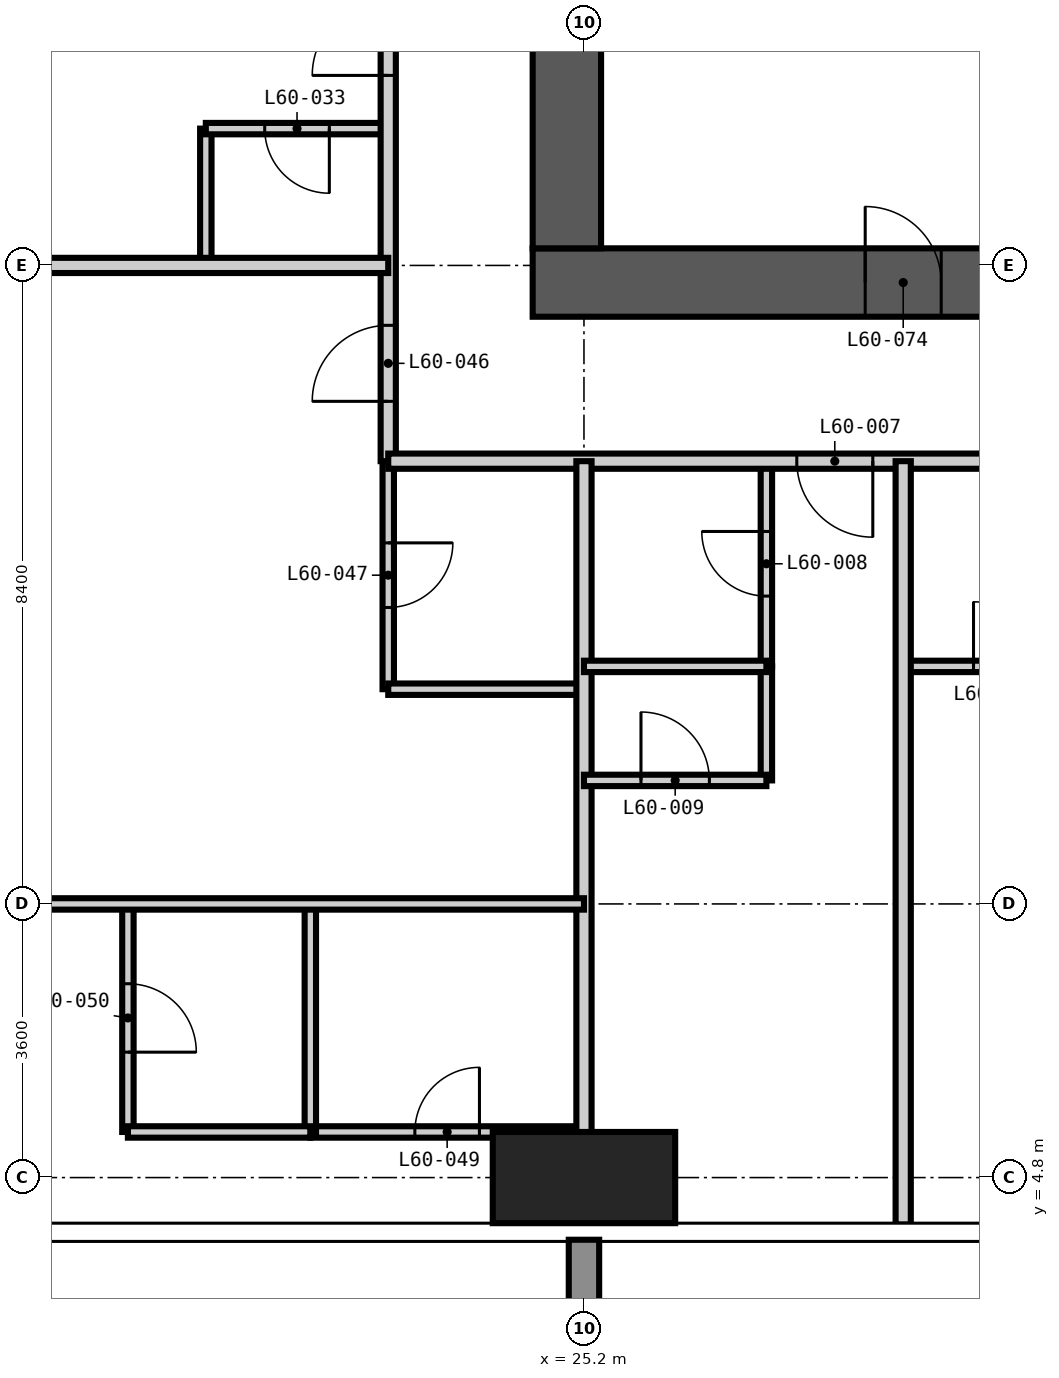
"""IFC4 building model, lengths in metres.
Left out: names, types, materials, properties, quantities, classifications, styles, units other than length and angle.
Written with IfcOpenShell. Run it as: python <this file> out.ifc"""

import sys

from ifc_helpers import new_model, si_unit, direction, frame, frame_2d, origin, origin_2d, place, context, subcontext, project, spatial, rectangle, extrude, element, fill, save


model = new_model("IFC4")
c1 = context("Model", 3, precision=1e-05, world=origin(), true_north=direction((0.0, 1.0)))
c2 = subcontext(c1, "Body", "Model", "MODEL_VIEW")
j1 = project(units=[si_unit("LENGTHUNIT", "METRE"), si_unit("PLANEANGLEUNIT", "RADIAN")], contexts=[c1])
p1 = place(None, origin())
s1 = spatial("IfcSite", under=j1, at=p1, CompositionType="ELEMENT")
p2 = place(p1, origin())
s2 = spatial("IfcBuilding", under=s1, at=p2, CompositionType="ELEMENT")
p3 = place(p2, frame((0.0, 0.0, 233.4)))
s3 = spatial("IfcBuildingStorey", under=s2, at=p3, CompositionType="ELEMENT", Elevation=233.4)
p4 = place(p3, frame((25.2, 4.8, -0.35), z_axis=(0.0, 0.0, 1.0), x_axis=(1.0, 0.0, 0.0)))
e1 = element("IfcColumn", 1, at=p4, inside=s3, PredefinedType="COLUMN", context=c2, shape_type="SweptSolid", body=[
    extrude(rectangle(XDim=2.4, YDim=1.2, at=origin_2d()), origin(), (0.0, 0.0, 1.0), 3.9),
])
p5 = place(p3, frame((24.525, 16.575, -0.35), z_axis=(0.0, 0.0, 1.0), x_axis=(1.0, 0.0, 0.0)))
e2 = element("IfcWall", 2, at=p5, inside=s3, PredefinedType="SHEAR", context=c2, shape_type="SweptSolid", body=[
    extrude(rectangle(XDim=18.15, YDim=0.9, at=frame_2d((9.075, 0.0))), origin(), (0.0, 0.0, 1.0), 3.9),
])
p6 = place(p5, frame((4.375, 0.0, 0.35)))
e3 = element("IfcOpeningElement", 3, at=p6, cuts=e2, PredefinedType="OPENING", context=c2, shape_type="SweptSolid", body=[
    extrude(rectangle(XDim=1.0, YDim=2.1, at=frame_2d((0.5, 1.05))), frame((0.0, 0.46, 0.0), z_axis=(0.0, -1.0, 0.0), x_axis=(1.0, 0.0, 0.0)), (0.0, 0.0, 1.0), 0.92),
])
p7 = place(p5, frame((10.675, 0.0, 0.35)))
e4 = element("IfcOpeningElement", 4, at=p7, cuts=e2, PredefinedType="OPENING", context=c2, shape_type="SweptSolid", body=[
    extrude(rectangle(XDim=1.0, YDim=2.1, at=frame_2d((0.5, 1.05))), frame((0.0, 0.46, 0.0), z_axis=(0.0, -1.0, 0.0), x_axis=(1.0, 0.0, 0.0)), (0.0, 0.0, 1.0), 0.92),
])
p8 = place(p3, frame((24.975, 41.775, -0.35), z_axis=(0.0, 0.0, 1.0), x_axis=(0.0, -1.0, 0.0)))
e5 = element("IfcWall", 5, at=p8, inside=s3, PredefinedType="SHEAR", context=c2, shape_type="SweptSolid", body=[
    extrude(rectangle(XDim=24.75, YDim=0.9, at=frame_2d((12.375, 0.0))), origin(), (0.0, 0.0, 1.0), 3.9),
])
p9 = place(p8, frame((11.875, 0.0, 0.35)))
e6 = element("IfcOpeningElement", 6, at=p9, cuts=e5, PredefinedType="OPENING", context=c2, shape_type="SweptSolid", body=[
    extrude(rectangle(XDim=1.0, YDim=2.1, at=frame_2d((0.5, 1.05))), frame((0.0, 0.46, 0.0), z_axis=(0.0, -1.0, 0.0), x_axis=(1.0, 0.0, 0.0)), (0.0, 0.0, 1.0), 0.92),
])
p10 = place(p3, frame((20.225, 16.8, 0.0), z_axis=(0.0, 0.0, 1.0), x_axis=(0.0, 1.0, 0.0)))
e7 = element("IfcWall", 7, at=p10, inside=s3, PredefinedType="PARTITIONING", context=c2, shape_type="SweptSolid", body=[
    extrude(rectangle(XDim=1.8, YDim=0.15, at=frame_2d((0.9, 0.0))), origin(), (0.0, 0.0, 1.0), 3.55),
])
p11 = place(p3, frame((22.625, 11.225, 0.0), z_axis=(0.0, 0.0, 1.0), x_axis=(0.0, 1.0, 0.0)))
e8 = element("IfcWall", 8, at=p11, inside=s3, PredefinedType="PARTITIONING", context=c2, shape_type="SweptSolid", body=[
    extrude(rectangle(XDim=3.0, YDim=0.15, at=frame_2d((1.5, 0.0))), origin(), (0.0, 0.0, 1.0), 3.55),
])
p12 = place(p11, frame((1.075, 0.0, 0.0)))
e9 = element("IfcOpeningElement", 9, at=p12, cuts=e8, PredefinedType="OPENING", context=c2, shape_type="SweptSolid", body=[
    extrude(rectangle(XDim=0.85, YDim=2.1, at=frame_2d((0.425, 1.05))), frame((0.0, 0.085, 0.0), z_axis=(0.0, -1.0, 0.0), x_axis=(1.0, 0.0, 0.0)), (0.0, 0.0, 1.0), 0.17),
])
p13 = place(p3, frame((27.6, 11.525, 0.0), z_axis=(0.0, 0.0, 1.0), x_axis=(0.0, 1.0, 0.0)))
e10 = element("IfcWall", 10, at=p13, inside=s3, PredefinedType="PARTITIONING", context=c2, shape_type="SweptSolid", body=[
    extrude(rectangle(XDim=2.7, YDim=0.15, at=frame_2d((1.35, 0.0))), origin(), (0.0, 0.0, 1.0), 3.55),
])
p14 = place(p13, frame((0.925, 0.0, 0.0)))
e11 = element("IfcOpeningElement", 11, at=p14, cuts=e10, PredefinedType="OPENING", context=c2, shape_type="SweptSolid", body=[
    extrude(rectangle(XDim=0.85, YDim=2.1, at=frame_2d((0.425, 1.05))), frame((0.0, 0.085, 0.0), z_axis=(0.0, -1.0, 0.0), x_axis=(1.0, 0.0, 0.0)), (0.0, 0.0, 1.0), 0.17),
])
p15 = place(p3, frame((21.6, 5.4, 0.0), z_axis=(0.0, 0.0, 1.0), x_axis=(1.0, 0.0, 0.0)))
e12 = element("IfcWall", 12, at=p15, inside=s3, PredefinedType="PARTITIONING", context=c2, shape_type="SweptSolid", body=[
    extrude(rectangle(XDim=3.6, YDim=0.15, at=frame_2d((1.8, 0.0))), origin(), (0.0, 0.0, 1.0), 3.55),
])
p16 = place(p15, frame((1.375, 0.0, 0.0)))
e13 = element("IfcOpeningElement", 13, at=p16, cuts=e12, PredefinedType="OPENING", context=c2, shape_type="SweptSolid", body=[
    extrude(rectangle(XDim=0.85, YDim=2.1, at=frame_2d((0.425, 1.05))), frame((0.0, 0.085, 0.0), z_axis=(0.0, -1.0, 0.0), x_axis=(1.0, 0.0, 0.0)), (0.0, 0.0, 1.0), 0.17),
])
p17 = place(p3, frame((22.625, 11.225, 0.0), z_axis=(0.0, 0.0, 1.0), x_axis=(1.0, 0.0, 0.0)))
e14 = element("IfcWall", 14, at=p17, inside=s3, PredefinedType="PARTITIONING", context=c2, shape_type="SweptSolid", body=[
    extrude(rectangle(XDim=2.575, YDim=0.15, at=frame_2d((1.288, 0.0))), origin(), (0.0, 0.0, 1.0), 3.55),
])
p18 = place(p3, frame((29.4, 11.525, 0.0), z_axis=(0.0, 0.0, 1.0), x_axis=(1.0, 0.0, 0.0)))
e15 = element("IfcWall", 15, at=p18, inside=s3, PredefinedType="PARTITIONING", context=c2, shape_type="SweptSolid", body=[
    extrude(rectangle(XDim=2.7, YDim=0.15, at=frame_2d((1.35, 0.0))), origin(), (0.0, 0.0, 1.0), 3.55),
])
p19 = place(p18, frame((0.925, 0.0, 0.0)))
e16 = element("IfcOpeningElement", 16, at=p19, cuts=e15, PredefinedType="OPENING", context=c2, shape_type="SweptSolid", body=[
    extrude(rectangle(XDim=0.85, YDim=2.1, at=frame_2d((0.425, 1.05))), frame((0.0, 0.085, 0.0), z_axis=(0.0, -1.0, 0.0), x_axis=(1.0, 0.0, 0.0)), (0.0, 0.0, 1.0), 0.17),
])
p20 = place(p3, frame((20.225, 18.6, 0.0), z_axis=(0.0, 0.0, 1.0), x_axis=(1.0, 0.0, 0.0)))
e17 = element("IfcWall", 17, at=p20, inside=s3, PredefinedType="PARTITIONING", context=c2, shape_type="SweptSolid", body=[
    extrude(rectangle(XDim=2.4, YDim=0.15, at=frame_2d((1.2, 0.0))), origin(), (0.0, 0.0, 1.0), 3.55),
])
p21 = place(p20, frame((0.775, 0.0, 0.0)))
e18 = element("IfcOpeningElement", 18, at=p21, cuts=e17, PredefinedType="OPENING", context=c2, shape_type="SweptSolid", body=[
    extrude(rectangle(XDim=0.85, YDim=2.1, at=frame_2d((0.425, 1.05))), frame((0.0, 0.085, 0.0), z_axis=(0.0, -1.0, 0.0), x_axis=(1.0, 0.0, 0.0)), (0.0, 0.0, 1.0), 0.17),
])
p22 = place(p3, frame((22.625, 14.225, 0.0), z_axis=(0.0, 0.0, 1.0), x_axis=(0.0, 1.0, 0.0)))
e19 = element("IfcWall", 19, at=p22, inside=s3, PredefinedType="PARTITIONING", context=c2, shape_type="SweptSolid", body=[
    extrude(rectangle(XDim=30.95, YDim=0.2, at=frame_2d((15.475, 0.0))), origin(), (0.0, 0.0, 1.0), 3.55),
])
p23 = place(p22, frame((5.075, 0.0, 0.0)))
e20 = element("IfcOpeningElement", 20, at=p23, cuts=e19, PredefinedType="OPENING", context=c2, shape_type="SweptSolid", body=[
    extrude(rectangle(XDim=1.0, YDim=2.2, at=frame_2d((0.5, 1.1))), frame((0.0, 0.11, 0.0), z_axis=(0.0, -1.0, 0.0), x_axis=(1.0, 0.0, 0.0)), (0.0, 0.0, 1.0), 0.22),
])
p24 = place(p22, frame((13.475, 0.0, 0.0)))
e21 = element("IfcOpeningElement", 21, at=p24, cuts=e19, PredefinedType="OPENING", context=c2, shape_type="SweptSolid", body=[
    extrude(rectangle(XDim=1.0, YDim=2.2, at=frame_2d((0.5, 1.1))), frame((0.0, 0.11, 0.0), z_axis=(0.0, -1.0, 0.0), x_axis=(1.0, 0.0, 0.0)), (0.0, 0.0, 1.0), 0.22),
])
p25 = place(p22, frame((21.875, 0.0, 0.0)))
e22 = element("IfcOpeningElement", 22, at=p25, cuts=e19, PredefinedType="OPENING", context=c2, shape_type="SweptSolid", body=[
    extrude(rectangle(XDim=1.0, YDim=2.2, at=frame_2d((0.5, 1.1))), frame((0.0, 0.11, 0.0), z_axis=(0.0, -1.0, 0.0), x_axis=(1.0, 0.0, 0.0)), (0.0, 0.0, 1.0), 0.22),
])
p26 = place(p22, frame((0.787, 0.0, 0.0)))
e23 = element("IfcOpeningElement", 23, at=p26, cuts=e19, PredefinedType="OPENING", context=c2, shape_type="SweptSolid", body=[
    extrude(rectangle(XDim=1.0, YDim=2.2, at=frame_2d((0.5, 1.1))), frame((0.0, 0.11, 0.0), z_axis=(0.0, -1.0, 0.0), x_axis=(1.0, 0.0, 0.0)), (0.0, 0.0, 1.0), 0.22),
])
p27 = place(p22, frame((28.862, 0.0, 0.0)))
e24 = element("IfcOpeningElement", 24, at=p27, cuts=e19, PredefinedType="OPENING", context=c2, shape_type="SweptSolid", body=[
    extrude(rectangle(XDim=1.0, YDim=2.2, at=frame_2d((0.5, 1.1))), frame((0.0, 0.11, 0.0), z_axis=(0.0, -1.0, 0.0), x_axis=(1.0, 0.0, 0.0)), (0.0, 0.0, 1.0), 0.22),
])
p28 = place(p3, frame((44.875, 14.225, 0.0), z_axis=(0.0, 0.0, 1.0), x_axis=(-1.0, 0.0, 0.0)))
e25 = element("IfcWall", 25, at=p28, inside=s3, PredefinedType="PARTITIONING", context=c2, shape_type="SweptSolid", body=[
    extrude(rectangle(XDim=22.25, YDim=0.2, at=frame_2d((11.125, 0.0))), origin(), (0.0, 0.0, 1.0), 3.55),
])
p29 = place(p28, frame((15.875, 0.0, 0.0)))
e26 = element("IfcOpeningElement", 26, at=p29, cuts=e25, PredefinedType="OPENING", context=c2, shape_type="SweptSolid", body=[
    extrude(rectangle(XDim=1.0, YDim=2.2, at=frame_2d((0.5, 1.1))), frame((0.0, 0.11, 0.0), z_axis=(0.0, -1.0, 0.0), x_axis=(1.0, 0.0, 0.0)), (0.0, 0.0, 1.0), 0.22),
])
p30 = place(p28, frame((9.425, 0.0, 0.0)))
e27 = element("IfcOpeningElement", 27, at=p30, cuts=e25, PredefinedType="OPENING", context=c2, shape_type="SweptSolid", body=[
    extrude(rectangle(XDim=1.0, YDim=2.2, at=frame_2d((0.5, 1.1))), frame((0.0, 0.11, 0.0), z_axis=(0.0, -1.0, 0.0), x_axis=(1.0, 0.0, 0.0)), (0.0, 0.0, 1.0), 0.22),
])
p31 = place(p28, frame((5.675, 0.0, 0.0)))
e28 = element("IfcOpeningElement", 28, at=p31, cuts=e25, PredefinedType="OPENING", context=c2, shape_type="SweptSolid", body=[
    extrude(rectangle(XDim=1.0, YDim=2.2, at=frame_2d((0.5, 1.1))), frame((0.0, 0.11, 0.0), z_axis=(0.0, -1.0, 0.0), x_axis=(1.0, 0.0, 0.0)), (0.0, 0.0, 1.0), 0.22),
])
for number, where, z_axis, x_axis in (
    (29, (25.2, 4.182, 0.0), (0.0, 0.0, 1.0), (0.0, 1.0, 0.0)),
    (30, (29.4, 4.182, 0.0), (0.0, 0.0, 1.0), (0.0, 1.0, 0.0)),
):
    element("IfcWall", number, at=place(p3, frame(where, z_axis=z_axis, x_axis=x_axis)), inside=s3, PredefinedType="PARTITIONING", context=c2, shape_type="SweptSolid", body=[
        extrude(rectangle(XDim=10.043, YDim=0.2, at=frame_2d((5.021, 0.0))), origin(), (0.0, 0.0, 1.0), 3.55),
    ])
p32 = place(p3, frame((12.582, 16.8, 0.0), z_axis=(0.0, 0.0, 1.0), x_axis=(1.0, 0.0, 0.0)))
e31 = element("IfcWall", 31, at=p32, inside=s3, PredefinedType="PARTITIONING", context=c2, shape_type="SweptSolid", body=[
    extrude(rectangle(XDim=10.043, YDim=0.2, at=frame_2d((5.021, 0.0))), origin(), (0.0, 0.0, 1.0), 3.55),
])
p33 = place(p3, frame((19.2, 5.4, 0.0), z_axis=(0.0, 0.0, 1.0), x_axis=(0.0, 1.0, 0.0)))
e32 = element("IfcWall", 32, at=p33, inside=s3, PredefinedType="PARTITIONING", context=c2, shape_type="SweptSolid", body=[
    extrude(rectangle(XDim=3.0, YDim=0.15, at=frame_2d((1.5, 0.0))), origin(), (0.0, 0.0, 1.0), 3.55),
])
p34 = place(p33, frame((1.05, 0.0, 0.0)))
e33 = element("IfcOpeningElement", 33, at=p34, cuts=e32, PredefinedType="OPENING", context=c2, shape_type="SweptSolid", body=[
    extrude(rectangle(XDim=0.9, YDim=2.1, at=frame_2d((0.45, 1.05))), frame((0.0, 0.085, 0.0), z_axis=(0.0, -1.0, 0.0), x_axis=(1.0, 0.0, 0.0)), (0.0, 0.0, 1.0), 0.17),
])
p35 = place(p3, frame((21.6, 5.4, 0.0), z_axis=(0.0, 0.0, 1.0), x_axis=(0.0, 1.0, 0.0)))
e34 = element("IfcWall", 34, at=p35, inside=s3, PredefinedType="PARTITIONING", context=c2, shape_type="SweptSolid", body=[
    extrude(rectangle(XDim=3.0, YDim=0.15, at=frame_2d((1.5, 0.0))), origin(), (0.0, 0.0, 1.0), 3.55),
])
p36 = place(p3, frame((27.6, 10.025, 0.0), z_axis=(0.0, 0.0, 1.0), x_axis=(0.0, 1.0, 0.0)))
e35 = element("IfcWall", 35, at=p36, inside=s3, PredefinedType="PARTITIONING", context=c2, shape_type="SweptSolid", body=[
    extrude(rectangle(XDim=1.5, YDim=0.15, at=frame_2d((0.75, 0.0))), origin(), (0.0, 0.0, 1.0), 3.55),
])
p37 = place(p3, frame((19.2, 5.4, 0.0), z_axis=(0.0, 0.0, 1.0), x_axis=(1.0, 0.0, 0.0)))
e36 = element("IfcWall", 36, at=p37, inside=s3, PredefinedType="PARTITIONING", context=c2, shape_type="SweptSolid", body=[
    extrude(rectangle(XDim=2.4, YDim=0.15, at=frame_2d((1.2, 0.0))), origin(), (0.0, 0.0, 1.0), 3.55),
])
p38 = place(p3, frame((12.582, 8.4, 0.0), z_axis=(0.0, 0.0, 1.0), x_axis=(1.0, 0.0, 0.0)))
e37 = element("IfcWall", 37, at=p38, inside=s3, PredefinedType="PARTITIONING", context=c2, shape_type="SweptSolid", body=[
    extrude(rectangle(XDim=12.618, YDim=0.15, at=frame_2d((6.309, 0.0))), origin(), (0.0, 0.0, 1.0), 3.55),
])
p39 = place(p38, frame((2.868, 0.0, 0.0)))
e38 = element("IfcOpeningElement", 38, at=p39, cuts=e37, PredefinedType="OPENING", context=c2, shape_type="SweptSolid", body=[
    extrude(rectangle(XDim=0.9, YDim=2.1, at=frame_2d((0.45, 1.05))), frame((0.0, 0.085, 0.0), z_axis=(0.0, -1.0, 0.0), x_axis=(1.0, 0.0, 0.0)), (0.0, 0.0, 1.0), 0.17),
])
p40 = place(p3, frame((25.2, 10.025, 0.0), z_axis=(0.0, 0.0, 1.0), x_axis=(1.0, 0.0, 0.0)))
e39 = element("IfcWall", 39, at=p40, inside=s3, PredefinedType="PARTITIONING", context=c2, shape_type="SweptSolid", body=[
    extrude(rectangle(XDim=2.4, YDim=0.15, at=frame_2d((1.2, 0.0))), origin(), (0.0, 0.0, 1.0), 3.55),
])
p41 = place(p40, frame((0.75, 0.0, 0.0)))
e40 = element("IfcOpeningElement", 40, at=p41, cuts=e39, PredefinedType="OPENING", context=c2, shape_type="SweptSolid", body=[
    extrude(rectangle(XDim=0.9, YDim=2.1, at=frame_2d((0.45, 1.05))), frame((0.0, 0.085, 0.0), z_axis=(0.0, -1.0, 0.0), x_axis=(1.0, 0.0, 0.0)), (0.0, 0.0, 1.0), 0.17),
])
p42 = place(p3, frame((25.2, 11.525, 0.0), z_axis=(0.0, 0.0, 1.0), x_axis=(1.0, 0.0, 0.0)))
e41 = element("IfcWall", 41, at=p42, inside=s3, PredefinedType="PARTITIONING", context=c2, shape_type="SweptSolid", body=[
    extrude(rectangle(XDim=2.4, YDim=0.15, at=frame_2d((1.2, 0.0))), origin(), (0.0, 0.0, 1.0), 3.55),
])
p43 = place(p29, origin())
e42 = element("IfcDoor", 42, at=p43, inside=s3, OperationType="SINGLE_SWING_LEFT", PredefinedType="DOOR", context=c2, shape_type="SweptSolid", body=[
    extrude(rectangle(XDim=1.0, YDim=2.2, at=frame_2d((0.5, 1.1))), frame((0.0, 0.025, 0.0), z_axis=(0.0, -1.0, 0.0), x_axis=(1.0, 0.0, 0.0)), (0.0, 0.0, 1.0), 0.05),
])
fill(e26, e42)
p44 = place(p14, origin())
e43 = element("IfcDoor", 43, at=p44, inside=s3, OperationType="SINGLE_SWING_RIGHT", PredefinedType="DOOR", context=c2, shape_type="SweptSolid", body=[
    extrude(rectangle(XDim=0.85, YDim=2.1, at=frame_2d((0.425, 1.05))), frame((0.0, 0.025, 0.0), z_axis=(0.0, -1.0, 0.0), x_axis=(1.0, 0.0, 0.0)), (0.0, 0.0, 1.0), 0.05),
])
fill(e11, e43)
p45 = place(p41, origin())
e44 = element("IfcDoor", 44, at=p45, inside=s3, OperationType="SINGLE_SWING_LEFT", PredefinedType="DOOR", context=c2, shape_type="SweptSolid", body=[
    extrude(rectangle(XDim=0.9, YDim=2.1, at=frame_2d((0.45, 1.05))), frame((0.0, 0.025, 0.0), z_axis=(0.0, -1.0, 0.0), x_axis=(1.0, 0.0, 0.0)), (0.0, 0.0, 1.0), 0.05),
])
fill(e40, e44)
p46 = place(p19, origin())
e45 = element("IfcDoor", 45, at=p46, inside=s3, OperationType="SINGLE_SWING_LEFT", PredefinedType="DOOR", context=c2, shape_type="SweptSolid", body=[
    extrude(rectangle(XDim=0.85, YDim=2.1, at=frame_2d((0.425, 1.05))), frame((0.0, 0.025, 0.0), z_axis=(0.0, -1.0, 0.0), x_axis=(1.0, 0.0, 0.0)), (0.0, 0.0, 1.0), 0.05),
])
fill(e16, e45)
p47 = place(p23, origin())
e46 = element("IfcDoor", 46, at=p47, inside=s3, OperationType="SINGLE_SWING_LEFT", PredefinedType="DOOR", context=c2, shape_type="SweptSolid", body=[
    extrude(rectangle(XDim=1.0, YDim=2.2, at=frame_2d((0.5, 1.1))), frame((0.0, 0.025, 0.0), z_axis=(0.0, -1.0, 0.0), x_axis=(1.0, 0.0, 0.0)), (0.0, 0.0, 1.0), 0.05),
])
fill(e20, e46)
p48 = place(p21, frame((0.85, 0.0, 0.0), z_axis=(0.0, 0.0, 1.0), x_axis=(-1.0, 0.0, 0.0)))
e47 = element("IfcDoor", 47, at=p48, inside=s3, OperationType="SINGLE_SWING_LEFT", PredefinedType="DOOR", context=c2, shape_type="SweptSolid", body=[
    extrude(rectangle(XDim=0.85, YDim=2.1, at=frame_2d((0.425, 1.05))), frame((0.0, 0.025, 0.0), z_axis=(0.0, -1.0, 0.0), x_axis=(1.0, 0.0, 0.0)), (0.0, 0.0, 1.0), 0.05),
])
fill(e18, e47)
p49 = place(p26, origin())
e48 = element("IfcDoor", 48, at=p49, inside=s3, OperationType="SINGLE_SWING_LEFT", PredefinedType="DOOR", context=c2, shape_type="SweptSolid", body=[
    extrude(rectangle(XDim=1.0, YDim=2.2, at=frame_2d((0.5, 1.1))), frame((0.0, 0.025, 0.0), z_axis=(0.0, -1.0, 0.0), x_axis=(1.0, 0.0, 0.0)), (0.0, 0.0, 1.0), 0.05),
])
fill(e23, e48)
p50 = place(p12, frame((0.85, 0.0, 0.0), z_axis=(0.0, 0.0, 1.0), x_axis=(-1.0, 0.0, 0.0)))
e49 = element("IfcDoor", 49, at=p50, inside=s3, OperationType="SINGLE_SWING_LEFT", PredefinedType="DOOR", context=c2, shape_type="SweptSolid", body=[
    extrude(rectangle(XDim=0.85, YDim=2.1, at=frame_2d((0.425, 1.05))), frame((0.0, 0.025, 0.0), z_axis=(0.0, -1.0, 0.0), x_axis=(1.0, 0.0, 0.0)), (0.0, 0.0, 1.0), 0.05),
])
fill(e9, e49)
p51 = place(p16, origin())
e50 = element("IfcDoor", 50, at=p51, inside=s3, OperationType="SINGLE_SWING_RIGHT", PredefinedType="DOOR", context=c2, shape_type="SweptSolid", body=[
    extrude(rectangle(XDim=0.85, YDim=2.1, at=frame_2d((0.425, 1.05))), frame((0.0, 0.025, 0.0), z_axis=(0.0, -1.0, 0.0), x_axis=(1.0, 0.0, 0.0)), (0.0, 0.0, 1.0), 0.05),
])
fill(e13, e50)
p52 = place(p34, frame((0.9, 0.0, 0.0), z_axis=(0.0, 0.0, 1.0), x_axis=(-1.0, 0.0, 0.0)))
e51 = element("IfcDoor", 51, at=p52, inside=s3, OperationType="SINGLE_SWING_RIGHT", PredefinedType="DOOR", context=c2, shape_type="SweptSolid", body=[
    extrude(rectangle(XDim=0.9, YDim=2.1, at=frame_2d((0.45, 1.05))), frame((0.0, 0.025, 0.0), z_axis=(0.0, -1.0, 0.0), x_axis=(1.0, 0.0, 0.0)), (0.0, 0.0, 1.0), 0.05),
])
fill(e33, e51)
p53 = place(p6, origin())
e52 = element("IfcDoor", 52, at=p53, inside=s3, OperationType="SINGLE_SWING_LEFT", PredefinedType="DOOR", context=c2, shape_type="SweptSolid", body=[
    extrude(rectangle(XDim=1.0, YDim=2.1, at=frame_2d((0.5, 1.05))), frame((0.0, 0.025, 0.0), z_axis=(0.0, -1.0, 0.0), x_axis=(1.0, 0.0, 0.0)), (0.0, 0.0, 1.0), 0.05),
])
fill(e3, e52)
save(model, sys.argv[1])
